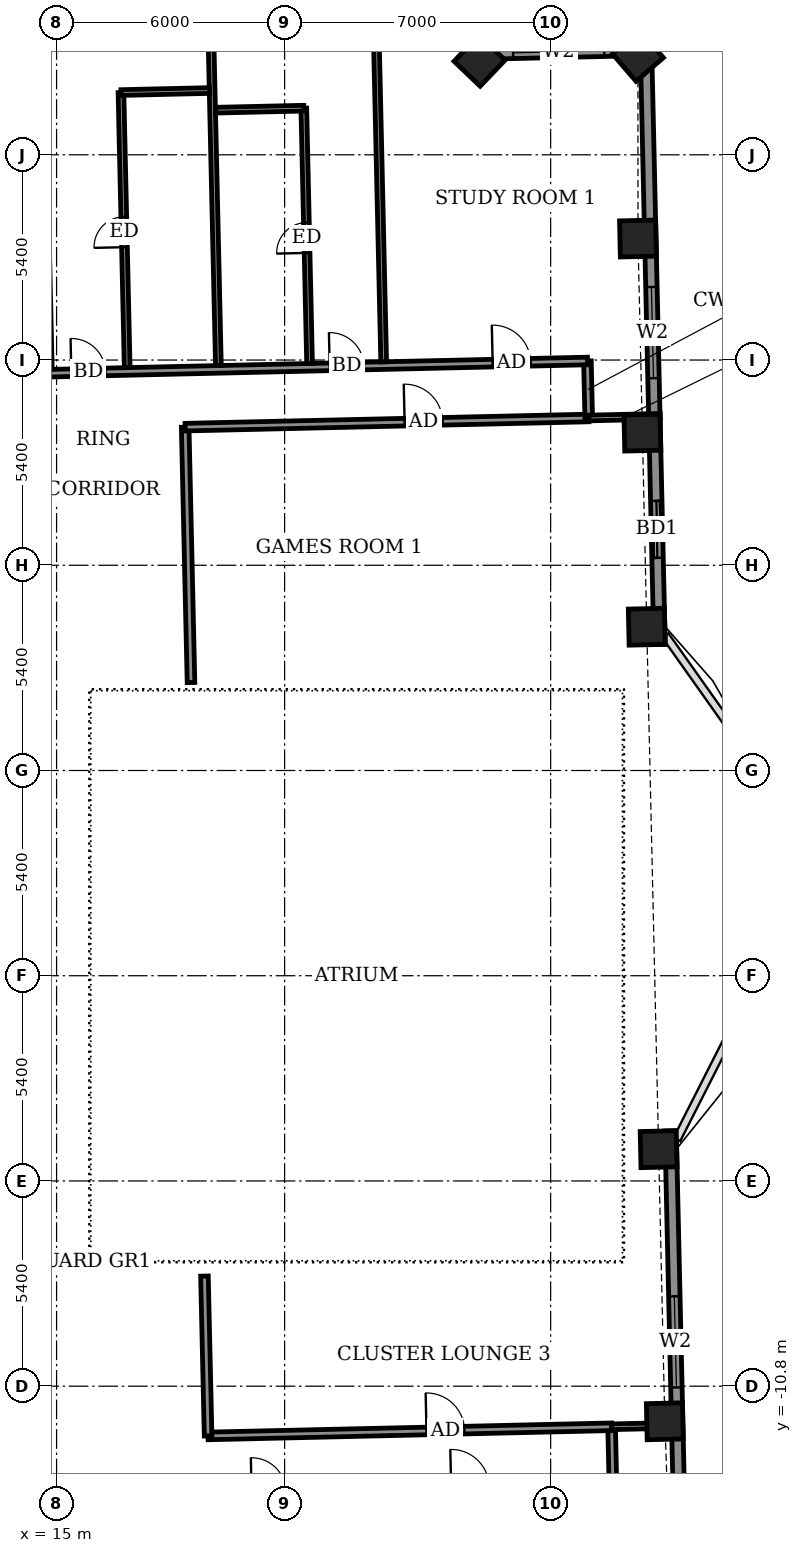
"""IFC4 building model, lengths in metres.
Left out: names, types, materials, properties, quantities, classifications, styles, units other than length and angle.
Written with IfcOpenShell. Run it as: python <this file> out.ifc"""

import sys

from ifc_helpers import new_model, si_unit, direction, frame, frame_2d, origin, origin_2d, place, context, subcontext, project, spatial, rectangle, extrude, element, fill, save


model = new_model("IFC4")
c1 = context("Model", 3, precision=1e-05, world=origin(), true_north=direction((0.0, 1.0)))
c2 = subcontext(c1, "Body", "Model", "MODEL_VIEW")
j1 = project(units=[si_unit("LENGTHUNIT", "METRE"), si_unit("PLANEANGLEUNIT", "RADIAN")], contexts=[c1])
p1 = place(None, origin())
s1 = spatial("IfcSite", under=j1, at=p1, CompositionType="ELEMENT")
p2 = place(p1, origin())
s2 = spatial("IfcBuilding", under=s1, at=p2, CompositionType="ELEMENT")
p3 = place(p2, frame((0.0, 0.0, 287.1)))
s3 = spatial("IfcBuildingStorey", under=s2, at=p3, CompositionType="ELEMENT", Elevation=287.1)
for number, where, z_axis, x_axis in (
    (1, (31.004, -11.724, -0.55), (0.0, 0.0, 1.0), (-0.023, 1.0, 0.0)),
    (2, (30.841, -4.564, -0.55), (0.0, 0.0, 1.0), (-0.023, 1.0, 0.0)),
    (3, (30.529, 9.183, -0.55), (0.0, 0.0, 1.0), (-0.023, 1.0, 0.0)),
    (4, (30.414, 14.29, -0.55), (0.0, 0.0, 1.0), (-0.023, 1.0, 0.0)),
    (5, (30.298, 19.397, -0.55), (0.0, 0.0, 1.0), (-0.023, 1.0, 0.0)),
    (6, (30.297, 24.205, -0.55), (0.0, 0.0, 1.0), (-0.652, 0.758, 0.0)),
    (7, (26.13, 24.077, -0.55), (0.0, 0.0, 1.0), (-0.723, 0.691, 0.0)),
):
    element("IfcColumn", number, at=place(p3, frame(where, z_axis=z_axis, x_axis=x_axis)), inside=s3, PredefinedType="COLUMN", context=c2, shape_type="SweptSolid", body=[
        extrude(rectangle(XDim=0.95, YDim=0.95, at=origin_2d()), origin(), (0.0, 0.0, 1.0), 3.6),
    ])
p4 = place(p3, frame((31.488, -18.727, 0.0), z_axis=(0.0, 0.0, 1.0), x_axis=(-0.022666132143, 0.999743090226, 0.0)))
e8 = element("IfcWall", 8, at=p4, inside=s3, PredefinedType="SOLIDWALL", context=c2, shape_type="SweptSolid", body=[
    extrude(rectangle(XDim=14.649, YDim=0.3, at=frame_2d((7.324, 0.0))), origin(), (0.0, 0.0, 1.0), 2.5),
])
p5 = place(p4, frame((2.915, 0.0, 0.0)))
e9 = element("IfcOpeningElement", 9, at=p5, cuts=e8, PredefinedType="OPENING", context=c2, shape_type="SweptSolid", body=[
    extrude(rectangle(XDim=1.5, YDim=2.4, at=frame_2d((0.75, 1.2))), frame((0.0, 0.16, 0.0), z_axis=(0.0, -1.0, 0.0), x_axis=(1.0, 0.0, 0.0)), (0.0, 0.0, 1.0), 0.32),
])
p6 = place(p4, frame((7.895, 0.0, 0.9)))
e10 = element("IfcOpeningElement", 10, at=p6, cuts=e8, PredefinedType="OPENING", context=c2, shape_type="SweptSolid", body=[
    extrude(rectangle(XDim=2.4, YDim=1.5, at=frame_2d((1.2, 0.75))), frame((0.0, 0.16, 0.0), z_axis=(0.0, -1.0, 0.0), x_axis=(1.0, 0.0, 0.0)), (0.0, 0.0, 1.0), 0.32),
])
p7 = place(p3, frame((30.865, 8.716, 0.0), z_axis=(0.0, 0.0, 1.0), x_axis=(-0.022682425427, 0.999742720692, 0.0)))
e11 = element("IfcWall", 11, at=p7, inside=s3, PredefinedType="SOLIDWALL", context=c2, shape_type="SweptSolid", body=[
    extrude(rectangle(XDim=15.65, YDim=0.3, at=frame_2d((7.825, 0.0))), origin(), (0.0, 0.0, 1.0), 2.55),
])
p8 = place(p7, frame((2.279, 0.0, 0.0)))
e12 = element("IfcOpeningElement", 12, at=p8, cuts=e11, PredefinedType="OPENING", context=c2, shape_type="SweptSolid", body=[
    extrude(rectangle(XDim=1.5, YDim=2.4, at=frame_2d((0.75, 1.2))), frame((0.0, 0.16, 0.0), z_axis=(0.0, -1.0, 0.0), x_axis=(1.0, 0.0, 0.0)), (0.0, 0.0, 1.0), 0.32),
])
p9 = place(p7, frame((7.008, 0.0, 0.9)))
e13 = element("IfcOpeningElement", 13, at=p9, cuts=e11, PredefinedType="OPENING", context=c2, shape_type="SweptSolid", body=[
    extrude(rectangle(XDim=2.4, YDim=1.5, at=frame_2d((1.2, 0.75))), frame((0.0, 0.16, 0.0), z_axis=(0.0, -1.0, 0.0), x_axis=(1.0, 0.0, 0.0)), (0.0, 0.0, 1.0), 0.32),
])
p10 = place(p3, frame((30.51, 24.362, 0.0), z_axis=(0.0, 0.0, 1.0), x_axis=(-0.999739037152, -0.022844202663, 0.0)))
e14 = element("IfcWall", 14, at=p10, inside=s3, PredefinedType="SOLIDWALL", context=c2, shape_type="SweptSolid", body=[
    extrude(rectangle(XDim=4.2, YDim=0.3, at=frame_2d((2.1, 0.0))), origin(), (0.0, 0.0, 1.0), 2.55),
])
p11 = place(p10, frame((1.1, 0.0, 0.9)))
e15 = element("IfcOpeningElement", 15, at=p11, cuts=e14, PredefinedType="OPENING", context=c2, shape_type="SweptSolid", body=[
    extrude(rectangle(XDim=2.4, YDim=1.5, at=frame_2d((1.2, 0.75))), frame((0.0, 0.16, 0.0), z_axis=(0.0, -1.0, 0.0), x_axis=(1.0, 0.0, 0.0)), (0.0, 0.0, 1.0), 0.32),
])
p12 = place(p3, frame((26.311, 24.266, 0.0), z_axis=(0.0, 0.0, 1.0), x_axis=(-0.022611811187, 0.999744320311, 0.0)))
e16 = element("IfcWall", 16, at=p12, inside=s3, PredefinedType="SOLIDWALL", context=c2, shape_type="SweptSolid", body=[
    extrude(rectangle(XDim=4.2, YDim=0.3, at=frame_2d((2.1, 0.0))), origin(), (0.0, 0.0, 1.0), 2.55),
])
p13 = place(p12, frame((0.688, 0.0, 0.9)))
e17 = element("IfcOpeningElement", 17, at=p13, cuts=e16, PredefinedType="OPENING", context=c2, shape_type="SweptSolid", body=[
    extrude(rectangle(XDim=2.4, YDim=1.5, at=frame_2d((1.2, 0.75))), frame((0.0, 0.16, 0.0), z_axis=(0.0, -1.0, 0.0), x_axis=(1.0, 0.0, 0.0)), (0.0, 0.0, 1.0), 0.32),
])
p14 = place(p3, frame((29.638, -13.368, 0.0), z_axis=(0.0, 0.0, 1.0), x_axis=(-0.022617910375, 0.999744182344, 0.0)))
e18 = element("IfcWall", 18, at=p14, inside=s3, PredefinedType="PARTITIONING", context=c2, shape_type="SweptSolid", body=[
    extrude(rectangle(XDim=1.5, YDim=0.2, at=frame_2d((0.75, 0.0))), origin(), (0.0, 0.0, 1.0), 3.05),
])
p15 = place(p3, frame((18.985, -12.109, 0.0), z_axis=(0.0, 0.0, 1.0), x_axis=(0.999742771882, 0.022680169073, 0.0)))
e19 = element("IfcWall", 19, at=p15, inside=s3, PredefinedType="PARTITIONING", context=c2, shape_type="SweptSolid", body=[
    extrude(rectangle(XDim=10.625, YDim=0.2, at=frame_2d((5.312, 0.0))), origin(), (0.0, 0.0, 1.0), 3.05),
])
p16 = place(p15, frame((5.75, 0.0, 0.0)))
e20 = element("IfcOpeningElement", 20, at=p16, cuts=e19, PredefinedType="OPENING", context=c2, shape_type="SweptSolid", body=[
    extrude(rectangle(XDim=1.0, YDim=2.1, at=frame_2d((0.5, 1.05))), frame((0.0, 0.11, 0.0), z_axis=(0.0, -1.0, 0.0), x_axis=(1.0, 0.0, 0.0)), (0.0, 0.0, 1.0), 0.22),
])
p17 = place(p3, frame((18.987, -12.109, 0.0), z_axis=(0.0, 0.0, 1.0), x_axis=(-0.022807092041, 0.999739884446, 0.0)))
e21 = element("IfcWall", 21, at=p17, inside=s3, PredefinedType="PARTITIONING", context=c2, shape_type="SweptSolid", body=[
    extrude(rectangle(XDim=4.207, YDim=0.2, at=frame_2d((2.104, 0.0))), origin(), (0.0, 0.0, 1.0), 3.05),
])
p18 = place(p3, frame((29.603, -11.868, 0.0), z_axis=(0.0, 0.0, 1.0), x_axis=(0.999741755729, 0.022724916977, 0.0)))
e22 = element("IfcWall", 22, at=p18, inside=s3, PredefinedType="PARTITIONING", context=c2, shape_type="SweptSolid", body=[
    extrude(rectangle(XDim=1.579, YDim=0.15, at=frame_2d((0.79, 0.0))), origin(), (0.0, 0.0, 1.0), 3.05),
])
p19 = place(p3, frame((18.537, 7.714, 0.0), z_axis=(0.0, 0.0, 1.0), x_axis=(-0.022773383809, 0.999740652864, 0.0)))
e23 = element("IfcWall", 23, at=p19, inside=s3, PredefinedType="PARTITIONING", context=c2, shape_type="SweptSolid", body=[
    extrude(rectangle(XDim=6.722, YDim=0.2, at=frame_2d((3.361, 0.0))), origin(), (0.0, 0.0, 1.0), 3.05),
])
p20 = place(p3, frame((18.382, 14.434, 0.0), z_axis=(0.0, 0.0, 1.0), x_axis=(0.999742819156, 0.02267808514, 0.0)))
e24 = element("IfcWall", 24, at=p20, inside=s3, PredefinedType="PARTITIONING", context=c2, shape_type="SweptSolid", body=[
    extrude(rectangle(XDim=10.625, YDim=0.2, at=frame_2d((5.313, 0.0))), origin(), (0.0, 0.0, 1.0), 3.05),
])
p21 = place(p20, frame((5.777, 0.0, 0.0)))
e25 = element("IfcOpeningElement", 25, at=p21, cuts=e24, PredefinedType="OPENING", context=c2, shape_type="SweptSolid", body=[
    extrude(rectangle(XDim=1.0, YDim=2.1, at=frame_2d((0.5, 1.05))), frame((0.0, 0.11, 0.0), z_axis=(0.0, -1.0, 0.0), x_axis=(1.0, 0.0, 0.0)), (0.0, 0.0, 1.0), 0.22),
])
p22 = place(p3, frame((29.002, 14.675, 0.0), z_axis=(0.0, 0.0, 1.0), x_axis=(-0.022617910375, 0.999744182344, 0.0)))
e26 = element("IfcWall", 26, at=p22, inside=s3, PredefinedType="PARTITIONING", context=c2, shape_type="SweptSolid", body=[
    extrude(rectangle(XDim=1.5, YDim=0.2, at=frame_2d((0.75, 0.0))), origin(), (0.0, 0.0, 1.0), 3.05),
])
p23 = place(p3, frame((29.005, 14.675, 0.0), z_axis=(0.0, 0.0, 1.0), x_axis=(0.999737243051, 0.022922583999, 0.0)))
e27 = element("IfcWall", 27, at=p23, inside=s3, PredefinedType="PARTITIONING", context=c2, shape_type="SweptSolid", body=[
    extrude(rectangle(XDim=1.875, YDim=0.15, at=frame_2d((0.937, 0.0))), origin(), (0.0, 0.0, 1.0), 2.55),
])
p24 = place(p3, frame((-26.401, 14.918, 0.0), z_axis=(0.0, 0.0, 1.0), x_axis=(0.99974239733, 0.022696673341, 0.0)))
e28 = element("IfcWall", 28, at=p24, inside=s3, PredefinedType="PARTITIONING", context=c2, shape_type="SweptSolid", body=[
    extrude(rectangle(XDim=55.386, YDim=0.2, at=frame_2d((27.693, 0.0))), origin(), (0.0, 0.0, 1.0), 3.05),
])
p25 = place(p24, frame((52.889, 0.0, 0.0)))
e29 = element("IfcOpeningElement", 29, at=p25, cuts=e28, PredefinedType="OPENING", context=c2, shape_type="SweptSolid", body=[
    extrude(rectangle(XDim=1.0, YDim=2.1, at=frame_2d((0.5, 1.05))), frame((0.0, 0.11, 0.0), z_axis=(0.0, -1.0, 0.0), x_axis=(1.0, 0.0, 0.0)), (0.0, 0.0, 1.0), 0.22),
])
p26 = place(p24, frame((48.6, 0.0, 0.0)))
e30 = element("IfcOpeningElement", 30, at=p26, cuts=e28, PredefinedType="OPENING", context=c2, shape_type="SweptSolid", body=[
    extrude(rectangle(XDim=0.9, YDim=2.1, at=frame_2d((0.45, 1.05))), frame((0.0, 0.11, 0.0), z_axis=(0.0, -1.0, 0.0), x_axis=(1.0, 0.0, 0.0)), (0.0, 0.0, 1.0), 0.22),
])
p27 = place(p24, frame((41.8, 0.0, 0.0)))
e31 = element("IfcOpeningElement", 31, at=p27, cuts=e28, PredefinedType="OPENING", context=c2, shape_type="SweptSolid", body=[
    extrude(rectangle(XDim=0.9, YDim=2.1, at=frame_2d((0.45, 1.05))), frame((0.0, 0.11, 0.0), z_axis=(0.0, -1.0, 0.0), x_axis=(1.0, 0.0, 0.0)), (0.0, 0.0, 1.0), 0.22),
])
p28 = place(p24, frame((39.675, 0.0, 0.0)))
e32 = element("IfcOpeningElement", 32, at=p28, cuts=e28, PredefinedType="OPENING", context=c2, shape_type="SweptSolid", body=[
    extrude(rectangle(XDim=0.9, YDim=2.1, at=frame_2d((0.45, 1.05))), frame((0.0, 0.11, 0.0), z_axis=(0.0, -1.0, 0.0), x_axis=(1.0, 0.0, 0.0)), (0.0, 0.0, 1.0), 0.22),
])
p29 = place(p24, frame((32.675, 0.0, 0.0)))
e33 = element("IfcOpeningElement", 33, at=p29, cuts=e28, PredefinedType="OPENING", context=c2, shape_type="SweptSolid", body=[
    extrude(rectangle(XDim=0.9, YDim=2.1, at=frame_2d((0.45, 1.05))), frame((0.0, 0.11, 0.0), z_axis=(0.0, -1.0, 0.0), x_axis=(1.0, 0.0, 0.0)), (0.0, 0.0, 1.0), 0.22),
])
p30 = place(p24, frame((30.4, 0.0, 0.0)))
e34 = element("IfcOpeningElement", 34, at=p30, cuts=e28, PredefinedType="OPENING", context=c2, shape_type="SweptSolid", body=[
    extrude(rectangle(XDim=0.9, YDim=2.1, at=frame_2d((0.45, 1.05))), frame((0.0, 0.11, 0.0), z_axis=(0.0, -1.0, 0.0), x_axis=(1.0, 0.0, 0.0)), (0.0, 0.0, 1.0), 0.22),
])
p31 = place(p24, frame((23.225, 0.0, 0.0)))
e35 = element("IfcOpeningElement", 35, at=p31, cuts=e28, PredefinedType="OPENING", context=c2, shape_type="SweptSolid", body=[
    extrude(rectangle(XDim=0.9, YDim=2.1, at=frame_2d((0.45, 1.05))), frame((0.0, 0.11, 0.0), z_axis=(0.0, -1.0, 0.0), x_axis=(1.0, 0.0, 0.0)), (0.0, 0.0, 1.0), 0.22),
])
p32 = place(p24, frame((20.9, 0.0, 0.0)))
e36 = element("IfcOpeningElement", 36, at=p32, cuts=e28, PredefinedType="OPENING", context=c2, shape_type="SweptSolid", body=[
    extrude(rectangle(XDim=0.9, YDim=2.1, at=frame_2d((0.45, 1.05))), frame((0.0, 0.11, 0.0), z_axis=(0.0, -1.0, 0.0), x_axis=(1.0, 0.0, 0.0)), (0.0, 0.0, 1.0), 0.22),
])
p33 = place(p24, frame((13.9, 0.0, 0.0)))
e37 = element("IfcOpeningElement", 37, at=p33, cuts=e28, PredefinedType="OPENING", context=c2, shape_type="SweptSolid", body=[
    extrude(rectangle(XDim=0.9, YDim=2.1, at=frame_2d((0.45, 1.05))), frame((0.0, 0.11, 0.0), z_axis=(0.0, -1.0, 0.0), x_axis=(1.0, 0.0, 0.0)), (0.0, 0.0, 1.0), 0.22),
])
p34 = place(p24, frame((11.775, 0.0, 0.0)))
e38 = element("IfcOpeningElement", 38, at=p34, cuts=e28, PredefinedType="OPENING", context=c2, shape_type="SweptSolid", body=[
    extrude(rectangle(XDim=0.9, YDim=2.1, at=frame_2d((0.45, 1.05))), frame((0.0, 0.11, 0.0), z_axis=(0.0, -1.0, 0.0), x_axis=(1.0, 0.0, 0.0)), (0.0, 0.0, 1.0), 0.22),
])
p35 = place(p24, frame((1.65, 0.0, 0.0)))
e39 = element("IfcOpeningElement", 39, at=p35, cuts=e28, PredefinedType="OPENING", context=c2, shape_type="SweptSolid", body=[
    extrude(rectangle(XDim=1.0, YDim=2.1, at=frame_2d((0.5, 1.05))), frame((0.0, 0.11, 0.0), z_axis=(0.0, -1.0, 0.0), x_axis=(1.0, 0.0, 0.0)), (0.0, 0.0, 1.0), 0.22),
])
p36 = place(p24, frame((7.025, 0.0, 0.0)))
e40 = element("IfcOpeningElement", 40, at=p36, cuts=e28, PredefinedType="OPENING", context=c2, shape_type="SweptSolid", body=[
    extrude(rectangle(XDim=0.9, YDim=2.1, at=frame_2d((0.45, 1.05))), frame((0.0, 0.11, 0.0), z_axis=(0.0, -1.0, 0.0), x_axis=(1.0, 0.0, 0.0)), (0.0, 0.0, 1.0), 0.22),
])
p37 = place(p3, frame((16.858, 16.0, 0.0), z_axis=(0.0, 0.0, 1.0), x_axis=(-0.022627186748, 0.999743972435, 0.0)))
e41 = element("IfcWall", 41, at=p37, inside=s3, PredefinedType="PARTITIONING", context=c2, shape_type="SweptSolid", body=[
    extrude(rectangle(XDim=7.24, YDim=0.15, at=frame_2d((3.62, 0.0))), origin(), (0.0, 0.0, 1.0), 3.05),
])
p38 = place(p37, frame((3.17, 0.0, 0.0)))
e42 = element("IfcOpeningElement", 42, at=p38, cuts=e41, PredefinedType="OPENING", context=c2, shape_type="SweptSolid", body=[
    extrude(rectangle(XDim=0.8, YDim=2.1, at=frame_2d((0.4, 1.05))), frame((0.0, 0.085, 0.0), z_axis=(0.0, -1.0, 0.0), x_axis=(1.0, 0.0, 0.0)), (0.0, 0.0, 1.0), 0.17),
])
p39 = place(p3, frame((19.258, 16.054, 0.0), z_axis=(0.0, 0.0, 1.0), x_axis=(-0.022740189192, 0.999741408463, 0.0)))
e43 = element("IfcWall", 43, at=p39, inside=s3, PredefinedType="PARTITIONING", context=c2, shape_type="SweptSolid", body=[
    extrude(rectangle(XDim=12.4, YDim=0.15, at=frame_2d((6.2, 0.0))), origin(), (0.0, 0.0, 1.0), 3.05),
])
p40 = place(p3, frame((21.657, 16.109, 0.0), z_axis=(0.0, 0.0, 1.0), x_axis=(-0.022634748998, 0.99974380125, 0.0)))
e44 = element("IfcWall", 44, at=p40, inside=s3, PredefinedType="PARTITIONING", context=c2, shape_type="SweptSolid", body=[
    extrude(rectangle(XDim=6.72, YDim=0.15, at=frame_2d((3.36, 0.0))), origin(), (0.0, 0.0, 1.0), 3.05),
])
p41 = place(p40, frame((2.91, 0.0, 0.0)))
e45 = element("IfcOpeningElement", 45, at=p41, cuts=e44, PredefinedType="OPENING", context=c2, shape_type="SweptSolid", body=[
    extrude(rectangle(XDim=0.8, YDim=2.1, at=frame_2d((0.4, 1.05))), frame((0.0, 0.085, 0.0), z_axis=(0.0, -1.0, 0.0), x_axis=(1.0, 0.0, 0.0)), (0.0, 0.0, 1.0), 0.17),
])
p42 = place(p3, frame((23.607, 16.153, 0.0), z_axis=(0.0, 0.0, 1.0), x_axis=(-0.022740189192, 0.999741408463, 0.0)))
e46 = element("IfcWall", 46, at=p42, inside=s3, PredefinedType="PARTITIONING", context=c2, shape_type="SweptSolid", body=[
    extrude(rectangle(XDim=12.4, YDim=0.15, at=frame_2d((6.2, 0.0))), origin(), (0.0, 0.0, 1.0), 2.55),
])
p43 = place(p3, frame((19.182, 22.774, 0.0), z_axis=(0.0, 0.0, 1.0), x_axis=(0.99974053329, 0.022778632478, 0.0)))
e47 = element("IfcWall", 47, at=p43, inside=s3, PredefinedType="PARTITIONING", context=c2, shape_type="SweptSolid", body=[
    extrude(rectangle(XDim=2.326, YDim=0.15, at=frame_2d((1.163, 0.0))), origin(), (0.0, 0.0, 1.0), 3.05),
])
p44 = place(p3, frame((16.696, 23.238, 0.0), z_axis=(0.0, 0.0, 1.0), x_axis=(0.999740478815, 0.022781023197, 0.0)))
e48 = element("IfcWall", 48, at=p44, inside=s3, PredefinedType="PARTITIONING", context=c2, shape_type="SweptSolid", body=[
    extrude(rectangle(XDim=2.325, YDim=0.15, at=frame_2d((1.163, 0.0))), origin(), (0.0, 0.0, 1.0), 3.05),
])
p45 = place(p6, origin())
e49 = element("IfcWindow", 49, at=p45, inside=s3, PartitioningType="DOUBLE_PANEL_VERTICAL", PredefinedType="WINDOW", context=c2, shape_type="SweptSolid", body=[
    extrude(rectangle(XDim=2.4, YDim=1.5, at=frame_2d((1.2, 0.75))), frame((0.0, 0.03, 0.0), z_axis=(0.0, -1.0, 0.0), x_axis=(1.0, 0.0, 0.0)), (0.0, 0.0, 1.0), 0.06),
])
fill(e10, e49)
p46 = place(p8, origin())
e50 = element("IfcDoor", 50, at=p46, inside=s3, OperationType="SLIDING_TO_LEFT", PredefinedType="DOOR", context=c2, shape_type="SweptSolid", body=[
    extrude(rectangle(XDim=1.5, YDim=2.4, at=frame_2d((0.75, 1.2))), frame((0.0, 0.025, 0.0), z_axis=(0.0, -1.0, 0.0), x_axis=(1.0, 0.0, 0.0)), (0.0, 0.0, 1.0), 0.05),
])
fill(e12, e50)
p47 = place(p9, origin())
e51 = element("IfcWindow", 51, at=p47, inside=s3, PartitioningType="DOUBLE_PANEL_VERTICAL", PredefinedType="WINDOW", context=c2, shape_type="SweptSolid", body=[
    extrude(rectangle(XDim=2.4, YDim=1.5, at=frame_2d((1.2, 0.75))), frame((0.0, 0.03, 0.0), z_axis=(0.0, -1.0, 0.0), x_axis=(1.0, 0.0, 0.0)), (0.0, 0.0, 1.0), 0.06),
])
fill(e13, e51)
p48 = place(p11, origin())
e52 = element("IfcWindow", 52, at=p48, inside=s3, PartitioningType="DOUBLE_PANEL_VERTICAL", PredefinedType="WINDOW", context=c2, shape_type="SweptSolid", body=[
    extrude(rectangle(XDim=2.4, YDim=1.5, at=frame_2d((1.2, 0.75))), frame((0.0, 0.03, 0.0), z_axis=(0.0, -1.0, 0.0), x_axis=(1.0, 0.0, 0.0)), (0.0, 0.0, 1.0), 0.06),
])
fill(e15, e52)
p49 = place(p16, origin())
e53 = element("IfcDoor", 53, at=p49, inside=s3, OperationType="SINGLE_SWING_LEFT", PredefinedType="DOOR", context=c2, shape_type="SweptSolid", body=[
    extrude(rectangle(XDim=1.0, YDim=2.1, at=frame_2d((0.5, 1.05))), frame((0.0, 0.025, 0.0), z_axis=(0.0, -1.0, 0.0), x_axis=(1.0, 0.0, 0.0)), (0.0, 0.0, 1.0), 0.05),
])
fill(e20, e53)
p50 = place(p21, origin())
e54 = element("IfcDoor", 54, at=p50, inside=s3, OperationType="SINGLE_SWING_RIGHT", PredefinedType="DOOR", context=c2, shape_type="SweptSolid", body=[
    extrude(rectangle(XDim=1.0, YDim=2.1, at=frame_2d((0.5, 1.05))), frame((0.0, 0.025, 0.0), z_axis=(0.0, -1.0, 0.0), x_axis=(1.0, 0.0, 0.0)), (0.0, 0.0, 1.0), 0.05),
])
fill(e25, e54)
p51 = place(p25, origin())
e55 = element("IfcDoor", 55, at=p51, inside=s3, OperationType="SINGLE_SWING_LEFT", PredefinedType="DOOR", context=c2, shape_type="SweptSolid", body=[
    extrude(rectangle(XDim=1.0, YDim=2.1, at=frame_2d((0.5, 1.05))), frame((0.0, 0.025, 0.0), z_axis=(0.0, -1.0, 0.0), x_axis=(1.0, 0.0, 0.0)), (0.0, 0.0, 1.0), 0.05),
])
fill(e29, e55)
p52 = place(p26, origin())
e56 = element("IfcDoor", 56, at=p52, inside=s3, OperationType="SINGLE_SWING_RIGHT", PredefinedType="DOOR", context=c2, shape_type="SweptSolid", body=[
    extrude(rectangle(XDim=0.9, YDim=2.1, at=frame_2d((0.45, 1.05))), frame((0.0, 0.025, 0.0), z_axis=(0.0, -1.0, 0.0), x_axis=(1.0, 0.0, 0.0)), (0.0, 0.0, 1.0), 0.05),
])
fill(e30, e56)
p53 = place(p41, origin())
e57 = element("IfcDoor", 57, at=p53, inside=s3, OperationType="SINGLE_SWING_RIGHT", PredefinedType="DOOR", context=c2, shape_type="SweptSolid", body=[
    extrude(rectangle(XDim=0.8, YDim=2.1, at=frame_2d((0.4, 1.05))), frame((0.0, 0.025, 0.0), z_axis=(0.0, -1.0, 0.0), x_axis=(1.0, 0.0, 0.0)), (0.0, 0.0, 1.0), 0.05),
])
fill(e45, e57)
p54 = place(p27, origin())
e58 = element("IfcDoor", 58, at=p54, inside=s3, OperationType="SINGLE_SWING_LEFT", PredefinedType="DOOR", context=c2, shape_type="SweptSolid", body=[
    extrude(rectangle(XDim=0.9, YDim=2.1, at=frame_2d((0.45, 1.05))), frame((0.0, 0.025, 0.0), z_axis=(0.0, -1.0, 0.0), x_axis=(1.0, 0.0, 0.0)), (0.0, 0.0, 1.0), 0.05),
])
fill(e31, e58)
p55 = place(p38, origin())
e59 = element("IfcDoor", 59, at=p55, inside=s3, OperationType="SINGLE_SWING_LEFT", PredefinedType="DOOR", context=c2, shape_type="SweptSolid", body=[
    extrude(rectangle(XDim=0.8, YDim=2.1, at=frame_2d((0.4, 1.05))), frame((0.0, 0.025, 0.0), z_axis=(0.0, -1.0, 0.0), x_axis=(1.0, 0.0, 0.0)), (0.0, 0.0, 1.0), 0.05),
])
fill(e42, e59)
save(model, sys.argv[1])
